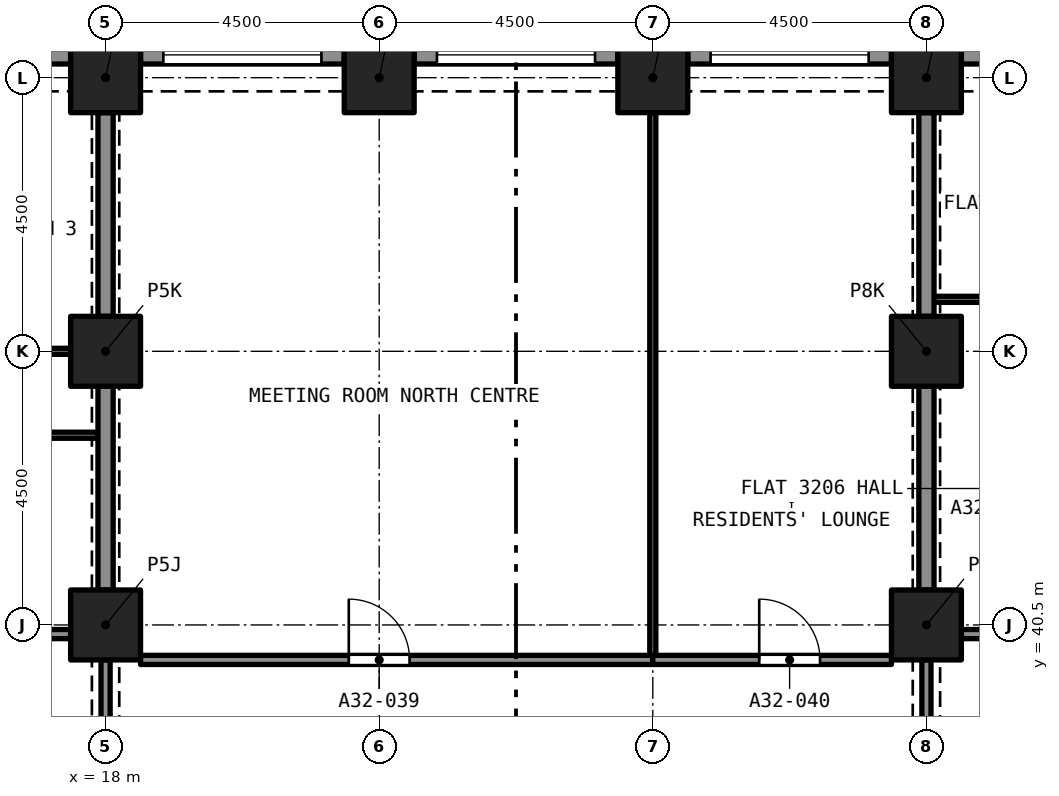
"""IFC4 building model, lengths in metres.
Left out: names, types, materials, properties, quantities, classifications, styles, units other than length and angle.
Written with IfcOpenShell. Run it as: python <this file> out.ifc"""

import sys

from ifc_helpers import new_model, si_unit, direction, frame, frame_2d, origin, origin_2d, place, context, subcontext, project, spatial, rectangle, extrude, element, fill, save


model = new_model("IFC4")
c1 = context("Model", 3, precision=1e-05, world=origin(), true_north=direction((0.0, 1.0)))
c2 = subcontext(c1, "Body", "Model", "MODEL_VIEW")
j1 = project(units=[si_unit("LENGTHUNIT", "METRE"), si_unit("PLANEANGLEUNIT", "RADIAN")], contexts=[c1])
p1 = place(None, origin())
s1 = spatial("IfcSite", under=j1, at=p1, CompositionType="ELEMENT")
p2 = place(p1, origin())
s2 = spatial("IfcBuilding", under=s1, at=p2, CompositionType="ELEMENT")
p3 = place(p2, frame((0.0, 0.0, 115.2)))
s3 = spatial("IfcBuildingStorey", under=s2, at=p3, CompositionType="ELEMENT", Elevation=115.2)
for number, where, z_axis, x_axis in (
    (1, (18.0, 40.5, 0.0), (0.0, 0.0, 1.0), (1.0, 0.0, 0.0)),
    (2, (31.5, 40.5, 0.0), (0.0, 0.0, 1.0), (1.0, 0.0, 0.0)),
    (3, (18.0, 45.0, 0.0), (0.0, 0.0, 1.0), (1.0, 0.0, 0.0)),
    (4, (31.5, 45.0, 0.0), (0.0, 0.0, 1.0), (1.0, 0.0, 0.0)),
    (5, (18.0, 49.5, 0.0), (0.0, 0.0, 1.0), (1.0, 0.0, 0.0)),
    (6, (22.5, 49.5, 0.0), (0.0, 0.0, 1.0), (1.0, 0.0, 0.0)),
    (7, (27.0, 49.5, 0.0), (0.0, 0.0, 1.0), (1.0, 0.0, 0.0)),
    (8, (31.5, 49.5, 0.0), (0.0, 0.0, 1.0), (1.0, 0.0, 0.0)),
):
    element("IfcColumn", number, at=place(p3, frame(where, z_axis=z_axis, x_axis=x_axis)), inside=s3, PredefinedType="COLUMN", context=c2, shape_type="SweptSolid", body=[
        extrude(rectangle(XDim=1.15, YDim=1.15, at=origin_2d()), origin(), (0.0, 0.0, 1.0), 3.2),
    ])
p4 = place(p3, frame((32.075, 49.875, 0.0), z_axis=(0.0, 0.0, 1.0), x_axis=(1.0, 0.0, 0.0)))
e9 = element("IfcWall", 9, at=p4, inside=s3, PredefinedType="SOLIDWALL", context=c2, shape_type="SweptSolid", body=[
    extrude(rectangle(XDim=3.35, YDim=0.3, at=frame_2d((1.675, 0.0))), origin(), (0.0, 0.0, 1.0), 3.2),
])
p5 = place(p4, frame((0.375, 0.0, 0.45)))
e10 = element("IfcOpeningElement", 10, at=p5, cuts=e9, PredefinedType="OPENING", context=c2, shape_type="SweptSolid", body=[
    extrude(rectangle(XDim=2.6, YDim=1.95, at=frame_2d((1.3, 0.975))), frame((0.0, 0.16, 0.0), z_axis=(0.0, -1.0, 0.0), x_axis=(1.0, 0.0, 0.0)), (0.0, 0.0, 1.0), 0.32),
])
p6 = place(p3, frame((27.575, 49.875, 0.0), z_axis=(0.0, 0.0, 1.0), x_axis=(1.0, 0.0, 0.0)))
e11 = element("IfcWall", 11, at=p6, inside=s3, PredefinedType="SOLIDWALL", context=c2, shape_type="SweptSolid", body=[
    extrude(rectangle(XDim=3.35, YDim=0.3, at=frame_2d((1.675, 0.0))), origin(), (0.0, 0.0, 1.0), 3.2),
])
p7 = place(p6, frame((0.375, 0.0, 0.45)))
e12 = element("IfcOpeningElement", 12, at=p7, cuts=e11, PredefinedType="OPENING", context=c2, shape_type="SweptSolid", body=[
    extrude(rectangle(XDim=2.6, YDim=1.95, at=frame_2d((1.3, 0.975))), frame((0.0, 0.16, 0.0), z_axis=(0.0, -1.0, 0.0), x_axis=(1.0, 0.0, 0.0)), (0.0, 0.0, 1.0), 0.32),
])
p8 = place(p3, frame((23.075, 49.875, 0.0), z_axis=(0.0, 0.0, 1.0), x_axis=(1.0, 0.0, 0.0)))
e13 = element("IfcWall", 13, at=p8, inside=s3, PredefinedType="SOLIDWALL", context=c2, shape_type="SweptSolid", body=[
    extrude(rectangle(XDim=3.35, YDim=0.3, at=frame_2d((1.675, 0.0))), origin(), (0.0, 0.0, 1.0), 3.2),
])
p9 = place(p8, frame((0.375, 0.0, 0.45)))
e14 = element("IfcOpeningElement", 14, at=p9, cuts=e13, PredefinedType="OPENING", context=c2, shape_type="SweptSolid", body=[
    extrude(rectangle(XDim=2.6, YDim=1.95, at=frame_2d((1.3, 0.975))), frame((0.0, 0.16, 0.0), z_axis=(0.0, -1.0, 0.0), x_axis=(1.0, 0.0, 0.0)), (0.0, 0.0, 1.0), 0.32),
])
p10 = place(p3, frame((18.575, 49.875, 0.0), z_axis=(0.0, 0.0, 1.0), x_axis=(1.0, 0.0, 0.0)))
e15 = element("IfcWall", 15, at=p10, inside=s3, PredefinedType="SOLIDWALL", context=c2, shape_type="SweptSolid", body=[
    extrude(rectangle(XDim=3.35, YDim=0.3, at=frame_2d((1.675, 0.0))), origin(), (0.0, 0.0, 1.0), 3.2),
])
p11 = place(p10, frame((0.375, 0.0, 0.45)))
e16 = element("IfcOpeningElement", 16, at=p11, cuts=e15, PredefinedType="OPENING", context=c2, shape_type="SweptSolid", body=[
    extrude(rectangle(XDim=2.6, YDim=1.95, at=frame_2d((1.3, 0.975))), frame((0.0, 0.16, 0.0), z_axis=(0.0, -1.0, 0.0), x_axis=(1.0, 0.0, 0.0)), (0.0, 0.0, 1.0), 0.32),
])
p12 = place(p3, frame((14.075, 49.875, 0.0), z_axis=(0.0, 0.0, 1.0), x_axis=(1.0, 0.0, 0.0)))
e17 = element("IfcWall", 17, at=p12, inside=s3, PredefinedType="SOLIDWALL", context=c2, shape_type="SweptSolid", body=[
    extrude(rectangle(XDim=3.35, YDim=0.3, at=frame_2d((1.675, 0.0))), origin(), (0.0, 0.0, 1.0), 3.2),
])
p13 = place(p12, frame((0.375, 0.0, 0.45)))
e18 = element("IfcOpeningElement", 18, at=p13, cuts=e17, PredefinedType="OPENING", context=c2, shape_type="SweptSolid", body=[
    extrude(rectangle(XDim=2.6, YDim=1.95, at=frame_2d((1.3, 0.975))), frame((0.0, 0.16, 0.0), z_axis=(0.0, -1.0, 0.0), x_axis=(1.0, 0.0, 0.0)), (0.0, 0.0, 1.0), 0.32),
])
p14 = place(p3, frame((13.5, 45.0, 0.0), z_axis=(0.0, 0.0, 1.0), x_axis=(1.0, 0.0, 0.0)))
e19 = element("IfcWall", 19, at=p14, inside=s3, PredefinedType="PARTITIONING", context=c2, shape_type="SweptSolid", body=[
    extrude(rectangle(XDim=3.925, YDim=0.1, at=frame_2d((1.962, 0.0))), origin(), (0.0, 0.0, 1.0), 2.9),
])
p15 = place(p14, frame((1.8, 0.0, 0.0)))
e20 = element("IfcOpeningElement", 20, at=p15, cuts=e19, PredefinedType="OPENING", context=c2, shape_type="SweptSolid", body=[
    extrude(rectangle(XDim=0.9, YDim=2.1, at=frame_2d((0.45, 1.05))), frame((0.0, 0.06, 0.0), z_axis=(0.0, -1.0, 0.0), x_axis=(1.0, 0.0, 0.0)), (0.0, 0.0, 1.0), 0.12),
])
p16 = place(p3, frame((18.0, 45.575, 0.0), z_axis=(0.0, 0.0, 1.0), x_axis=(0.0, 1.0, 0.0)))
e21 = element("IfcWall", 21, at=p16, inside=s3, PredefinedType="PARTITIONING", context=c2, shape_type="SweptSolid", body=[
    extrude(rectangle(XDim=3.35, YDim=0.25, at=frame_2d((1.675, 0.0))), origin(), (0.0, 0.0, 1.0), 2.38),
])
p17 = place(p3, frame((17.875, 43.62, 0.0), z_axis=(0.0, 0.0, 1.0), x_axis=(-1.0, 0.0, 0.0)))
e22 = element("IfcWall", 22, at=p17, inside=s3, PredefinedType="PARTITIONING", context=c2, shape_type="SweptSolid", body=[
    extrude(rectangle(XDim=6.064, YDim=0.1, at=frame_2d((3.032, 0.0))), origin(), (0.0, 0.0, 1.0), 2.9),
])
p18 = place(p17, frame((2.52, 0.0, 0.0)))
e23 = element("IfcOpeningElement", 23, at=p18, cuts=e22, PredefinedType="OPENING", context=c2, shape_type="SweptSolid", body=[
    extrude(rectangle(XDim=0.9, YDim=2.1, at=frame_2d((0.45, 1.05))), frame((0.0, 0.06, 0.0), z_axis=(0.0, -1.0, 0.0), x_axis=(1.0, 0.0, 0.0)), (0.0, 0.0, 1.0), 0.12),
])
p19 = place(p3, frame((18.0, 41.075, 0.0), z_axis=(0.0, 0.0, 1.0), x_axis=(0.0, 1.0, 0.0)))
e24 = element("IfcWall", 24, at=p19, inside=s3, PredefinedType="PARTITIONING", context=c2, shape_type="SweptSolid", body=[
    extrude(rectangle(XDim=3.35, YDim=0.25, at=frame_2d((1.675, 0.0))), origin(), (0.0, 0.0, 1.0), 2.38),
])
p20 = place(p3, frame((13.35, 40.35, 0.0), z_axis=(0.0, 0.0, 1.0), x_axis=(1.0, 0.0, 0.0)))
e25 = element("IfcWall", 25, at=p20, inside=s3, PredefinedType="PARTITIONING", context=c2, shape_type="SweptSolid", body=[
    extrude(rectangle(XDim=4.075, YDim=0.15, at=frame_2d((2.038, 0.0))), origin(), (0.0, 0.0, 1.0), 2.9),
])
p21 = place(p3, frame((31.625, 45.855, 0.0), z_axis=(0.0, 0.0, 1.0), x_axis=(1.0, 0.0, 0.0)))
e26 = element("IfcWall", 26, at=p21, inside=s3, PredefinedType="PARTITIONING", context=c2, shape_type="SweptSolid", body=[
    extrude(rectangle(XDim=4.375, YDim=0.1, at=frame_2d((2.188, 0.0))), origin(), (0.0, 0.0, 1.0), 2.9),
])
p22 = place(p21, frame((1.625, 0.0, 0.0)))
e27 = element("IfcOpeningElement", 27, at=p22, cuts=e26, PredefinedType="OPENING", context=c2, shape_type="SweptSolid", body=[
    extrude(rectangle(XDim=1.0, YDim=2.1, at=frame_2d((0.5, 1.05))), frame((0.0, 0.06, 0.0), z_axis=(0.0, -1.0, 0.0), x_axis=(1.0, 0.0, 0.0)), (0.0, 0.0, 1.0), 0.12),
])
for number, where, z_axis, x_axis in (
    (28, (31.5, 41.075, 0.0), (0.0, 0.0, 1.0), (0.0, 1.0, 0.0)),
    (29, (31.5, 45.575, 0.0), (0.0, 0.0, 1.0), (0.0, 1.0, 0.0)),
):
    element("IfcWall", number, at=place(p3, frame(where, z_axis=z_axis, x_axis=x_axis)), inside=s3, PredefinedType="PARTITIONING", context=c2, shape_type="SweptSolid", body=[
        extrude(rectangle(XDim=3.35, YDim=0.25, at=frame_2d((1.675, 0.0))), origin(), (0.0, 0.0, 1.0), 2.38),
    ])
p23 = place(p3, frame((32.075, 40.35, 0.0), z_axis=(0.0, 0.0, 1.0), x_axis=(1.0, 0.0, 0.0)))
e30 = element("IfcWall", 30, at=p23, inside=s3, PredefinedType="PARTITIONING", context=c2, shape_type="SweptSolid", body=[
    extrude(rectangle(XDim=2.425, YDim=0.15, at=frame_2d((1.212, 0.0))), origin(), (0.0, 0.0, 1.0), 2.9),
])
p24 = place(p23, frame((1.175, 0.0, 0.0)))
e31 = element("IfcOpeningElement", 31, at=p24, cuts=e30, PredefinedType="OPENING", context=c2, shape_type="SweptSolid", body=[
    extrude(rectangle(XDim=1.0, YDim=2.1, at=frame_2d((0.5, 1.05))), frame((0.0, 0.085, 0.0), z_axis=(0.0, -1.0, 0.0), x_axis=(1.0, 0.0, 0.0)), (0.0, 0.0, 1.0), 0.17),
])
p25 = place(p3, frame((18.575, 39.925, 0.0), z_axis=(0.0, 0.0, 1.0), x_axis=(1.0, 0.0, 0.0)))
e32 = element("IfcWall", 32, at=p25, inside=s3, PredefinedType="PARTITIONING", context=c2, shape_type="SweptSolid", body=[
    extrude(rectangle(XDim=8.425, YDim=0.15, at=frame_2d((4.212, 0.0))), origin(), (0.0, 0.0, 1.0), 2.75),
])
p26 = place(p25, frame((3.425, 0.0, 0.0)))
e33 = element("IfcOpeningElement", 33, at=p26, cuts=e32, PredefinedType="OPENING", context=c2, shape_type="SweptSolid", body=[
    extrude(rectangle(XDim=1.0, YDim=2.1, at=frame_2d((0.5, 1.05))), frame((0.0, 0.085, 0.0), z_axis=(0.0, -1.0, 0.0), x_axis=(1.0, 0.0, 0.0)), (0.0, 0.0, 1.0), 0.17),
])
p27 = place(p3, frame((27.0, 39.925, 0.0), z_axis=(0.0, 0.0, 1.0), x_axis=(1.0, 0.0, 0.0)))
e34 = element("IfcWall", 34, at=p27, inside=s3, PredefinedType="PARTITIONING", context=c2, shape_type="SweptSolid", body=[
    extrude(rectangle(XDim=3.925, YDim=0.15, at=frame_2d((1.962, 0.0))), origin(), (0.0, 0.0, 1.0), 2.75),
])
p28 = place(p27, frame((1.75, 0.0, 0.0)))
e35 = element("IfcOpeningElement", 35, at=p28, cuts=e34, PredefinedType="OPENING", context=c2, shape_type="SweptSolid", body=[
    extrude(rectangle(XDim=1.0, YDim=2.1, at=frame_2d((0.5, 1.05))), frame((0.0, 0.085, 0.0), z_axis=(0.0, -1.0, 0.0), x_axis=(1.0, 0.0, 0.0)), (0.0, 0.0, 1.0), 0.17),
])
p29 = place(p3, frame((31.5, 36.575, 0.0), z_axis=(0.0, 0.0, 1.0), x_axis=(0.0, 1.0, 0.0)))
e36 = element("IfcWall", 36, at=p29, inside=s3, PredefinedType="PARTITIONING", context=c2, shape_type="SweptSolid", body=[
    extrude(rectangle(XDim=3.35, YDim=0.15, at=frame_2d((1.675, 0.0))), origin(), (0.0, 0.0, 1.0), 2.38),
])
p30 = place(p29, frame((1.075, 0.0, 0.0)))
e37 = element("IfcOpeningElement", 37, at=p30, cuts=e36, PredefinedType="OPENING", context=c2, shape_type="SweptSolid", body=[
    extrude(rectangle(XDim=1.2, YDim=2.1, at=frame_2d((0.6, 1.05))), frame((0.0, 0.085, 0.0), z_axis=(0.0, -1.0, 0.0), x_axis=(1.0, 0.0, 0.0)), (0.0, 0.0, 1.0), 0.17),
])
p31 = place(p3, frame((18.0, 39.925, 0.0), z_axis=(0.0, 0.0, 1.0), x_axis=(0.0, -1.0, 0.0)))
e38 = element("IfcWall", 38, at=p31, inside=s3, PredefinedType="PARTITIONING", context=c2, shape_type="SweptSolid", body=[
    extrude(rectangle(XDim=3.35, YDim=0.15, at=frame_2d((1.675, 0.0))), origin(), (0.0, 0.0, 1.0), 2.38),
])
p32 = place(p31, frame((1.075, 0.0, 0.0)))
e39 = element("IfcOpeningElement", 39, at=p32, cuts=e38, PredefinedType="OPENING", context=c2, shape_type="SweptSolid", body=[
    extrude(rectangle(XDim=1.2, YDim=2.1, at=frame_2d((0.6, 1.05))), frame((0.0, 0.085, 0.0), z_axis=(0.0, -1.0, 0.0), x_axis=(1.0, 0.0, 0.0)), (0.0, 0.0, 1.0), 0.17),
])
p33 = place(p3, frame((27.0, 40.0, 0.0), z_axis=(0.0, 0.0, 1.0), x_axis=(0.0, 1.0, 0.0)))
e40 = element("IfcWall", 40, at=p33, inside=s3, PredefinedType="PARTITIONING", context=c2, shape_type="SweptSolid", body=[
    extrude(rectangle(XDim=8.925, YDim=0.1, at=frame_2d((4.462, 0.0))), origin(), (0.0, 0.0, 1.0), 2.75),
])
p34 = place(p7, origin())
e41 = element("IfcWindow", 41, at=p34, inside=s3, PartitioningType="SINGLE_PANEL", PredefinedType="WINDOW", context=c2, shape_type="SweptSolid", body=[
    extrude(rectangle(XDim=2.6, YDim=1.95, at=frame_2d((1.3, 0.975))), frame((0.0, 0.03, 0.0), z_axis=(0.0, -1.0, 0.0), x_axis=(1.0, 0.0, 0.0)), (0.0, 0.0, 1.0), 0.06),
])
fill(e12, e41)
p35 = place(p9, origin())
e42 = element("IfcWindow", 42, at=p35, inside=s3, PartitioningType="SINGLE_PANEL", PredefinedType="WINDOW", context=c2, shape_type="SweptSolid", body=[
    extrude(rectangle(XDim=2.6, YDim=1.95, at=frame_2d((1.3, 0.975))), frame((0.0, 0.03, 0.0), z_axis=(0.0, -1.0, 0.0), x_axis=(1.0, 0.0, 0.0)), (0.0, 0.0, 1.0), 0.06),
])
fill(e14, e42)
p36 = place(p11, origin())
e43 = element("IfcWindow", 43, at=p36, inside=s3, PartitioningType="SINGLE_PANEL", PredefinedType="WINDOW", context=c2, shape_type="SweptSolid", body=[
    extrude(rectangle(XDim=2.6, YDim=1.95, at=frame_2d((1.3, 0.975))), frame((0.0, 0.03, 0.0), z_axis=(0.0, -1.0, 0.0), x_axis=(1.0, 0.0, 0.0)), (0.0, 0.0, 1.0), 0.06),
])
fill(e16, e43)
p37 = place(p26, origin())
e44 = element("IfcDoor", 44, at=p37, inside=s3, OperationType="SINGLE_SWING_LEFT", PredefinedType="DOOR", context=c2, shape_type="SweptSolid", body=[
    extrude(rectangle(XDim=1.0, YDim=2.1, at=frame_2d((0.5, 1.05))), frame((0.0, 0.025, 0.0), z_axis=(0.0, -1.0, 0.0), x_axis=(1.0, 0.0, 0.0)), (0.0, 0.0, 1.0), 0.05),
])
fill(e33, e44)
p38 = place(p28, origin())
e45 = element("IfcDoor", 45, at=p38, inside=s3, OperationType="SINGLE_SWING_RIGHT", PredefinedType="DOOR", context=c2, shape_type="SweptSolid", body=[
    extrude(rectangle(XDim=1.0, YDim=2.1, at=frame_2d((0.5, 1.05))), frame((0.0, 0.025, 0.0), z_axis=(0.0, -1.0, 0.0), x_axis=(1.0, 0.0, 0.0)), (0.0, 0.0, 1.0), 0.05),
])
fill(e35, e45)
save(model, sys.argv[1])
